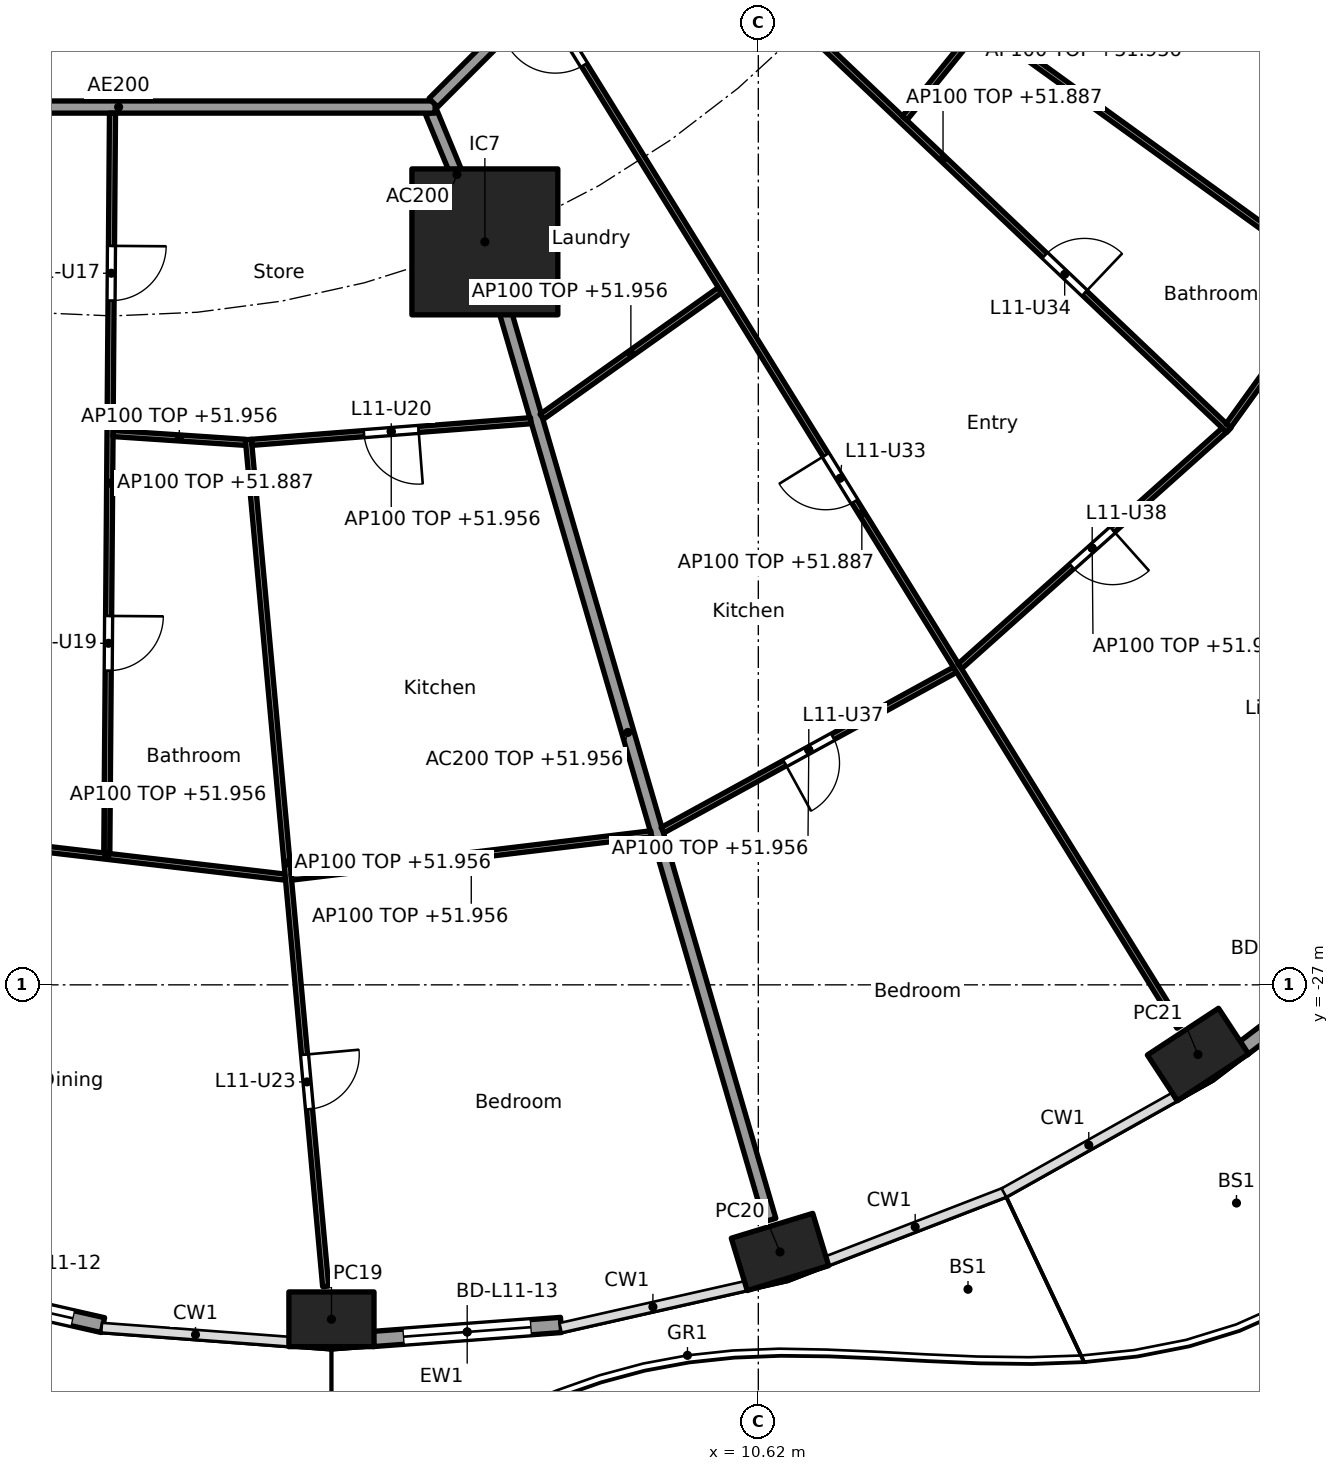
"""IFC4 building model, lengths in metres.
Left out: names, types, materials, properties, quantities, classifications, styles, units other than length and angle.
Written with IfcOpenShell. Run it as: python <this file> out.ifc"""

import sys

from ifc_helpers import new_model, si_unit, direction, frame, frame_2d, origin, origin_2d, place, context, subcontext, project, spatial, rectangle, hollow_rectangle, extrude, element, fill, save


model = new_model("IFC4")
c1 = context("Model", 3, precision=1e-05, world=origin(), true_north=direction((0.0, 1.0)))
c2 = subcontext(c1, "Body", "Model", "MODEL_VIEW")
j1 = project(units=[si_unit("LENGTHUNIT", "METRE"), si_unit("PLANEANGLEUNIT", "RADIAN")], contexts=[c1])
p1 = place(None, origin())
s1 = spatial("IfcSite", under=j1, at=p1, CompositionType="ELEMENT")
p2 = place(p1, origin())
s2 = spatial("IfcBuilding", under=s1, at=p2, CompositionType="ELEMENT")
p3 = place(p2, frame((0.0, 0.0, 49.2)))
s3 = spatial("IfcBuildingStorey", under=s2, at=p3, CompositionType="ELEMENT", Elevation=49.2)
for number, where, z_axis, x_axis in (
    (1, (3.6, -32.5, 0.0), (0.0, 0.0, 1.0), (1.0, 0.0, 0.0)),
    (2, (10.976, -31.393, 0.0), (0.0, 0.0, 1.0), (0.957, 0.292, 0.0)),
    (3, (17.85, -28.146, 0.0), (0.0, 0.0, 1.0), (0.836, 0.549, 0.0)),
):
    element("IfcColumn", number, at=place(p3, frame(where, z_axis=z_axis, x_axis=x_axis)), inside=s3, PredefinedType="COLUMN", context=c2, shape_type="SweptSolid", body=[
        extrude(hollow_rectangle(XDim=1.4, YDim=0.9, WallThickness=0.05, at=origin_2d()), origin(), (0.0, 0.0, 1.0), 3.7),
    ])
p4 = place(p3, frame((6.123, -14.782, 0.0), z_axis=(0.0, 0.0, 1.0), x_axis=(1.0, 0.0, 0.0)))
e4 = element("IfcColumn", 4, at=p4, inside=s3, PredefinedType="COLUMN", context=c2, shape_type="SweptSolid", body=[
    extrude(rectangle(XDim=2.4, YDim=2.4, at=origin_2d()), origin(), (0.0, 0.0, 1.0), 3.7),
])
p5 = place(p3, frame((-0.158, -32.596, 0.0), z_axis=(0.0, 0.0, 1.0), x_axis=(-0.975331134677, 0.220746863466, 0.0)))
e5 = element("IfcWall", 5, at=p5, inside=s3, PredefinedType="SOLIDWALL", context=c2, shape_type="SweptSolid", body=[
    extrude(rectangle(XDim=3.115, YDim=0.25, at=frame_2d((1.557, 0.0))), origin(), (0.0, 0.0, 1.0), 3.44),
])
p6 = place(p5, frame((0.507, 0.0, 0.0)))
e6 = element("IfcOpeningElement", 6, at=p6, cuts=e5, PredefinedType="OPENING", context=c2, shape_type="SweptSolid", body=[
    extrude(rectangle(XDim=2.1, YDim=2.4, at=frame_2d((1.05, 1.2))), frame((0.0, 0.135, 0.0), z_axis=(0.0, -1.0, 0.0), x_axis=(1.0, 0.0, 0.0)), (0.0, 0.0, 1.0), 0.27),
])
p7 = place(p3, frame((7.376, -32.593, 0.0), z_axis=(0.0, 0.0, 1.0), x_axis=(-0.997230834878, -0.074368420505, 0.0)))
e7 = element("IfcWall", 7, at=p7, inside=s3, PredefinedType="SOLIDWALL", context=c2, shape_type="SweptSolid", body=[
    extrude(rectangle(XDim=3.096, YDim=0.25, at=frame_2d((1.548, 0.0))), origin(), (0.0, 0.0, 1.0), 3.44),
])
p8 = place(p7, frame((0.498, 0.0, 0.0)))
e8 = element("IfcOpeningElement", 8, at=p8, cuts=e7, PredefinedType="OPENING", context=c2, shape_type="SweptSolid", body=[
    extrude(rectangle(XDim=2.1, YDim=2.4, at=frame_2d((1.05, 1.2))), frame((0.0, 0.135, 0.0), z_axis=(0.0, -1.0, 0.0), x_axis=(1.0, 0.0, 0.0)), (0.0, 0.0, 1.0), 0.27),
])
p9 = place(p3, frame((21.178, -26.081, 0.0), z_axis=(0.0, 0.0, 1.0), x_axis=(-0.796022293214, -0.605267303517, 0.0)))
e9 = element("IfcWall", 9, at=p9, inside=s3, PredefinedType="SOLIDWALL", context=c2, shape_type="SweptSolid", body=[
    extrude(rectangle(XDim=3.262, YDim=0.25, at=frame_2d((1.631, 0.0))), origin(), (0.0, 0.0, 1.0), 3.44),
])
p10 = place(p9, frame((0.581, 0.0, 0.0)))
e10 = element("IfcOpeningElement", 10, at=p10, cuts=e9, PredefinedType="OPENING", context=c2, shape_type="SweptSolid", body=[
    extrude(rectangle(XDim=2.1, YDim=2.4, at=frame_2d((1.05, 1.2))), frame((0.0, 0.135, 0.0), z_axis=(0.0, -1.0, 0.0), x_axis=(1.0, 0.0, 0.0)), (0.0, 0.0, 1.0), 0.27),
])
p11 = place(p3, frame((5.243, -12.657, 0.0), z_axis=(0.0, 0.0, 1.0), x_axis=(0.382707856524, -0.923869415315, 0.0)))
e11 = element("IfcWall", 11, at=p11, inside=s3, PredefinedType="PARTITIONING", context=c2, shape_type="SweptSolid", body=[
    extrude(rectangle(XDim=2.2, YDim=0.2, at=frame_2d((1.1, 0.0))), origin(), (0.0, 0.0, 1.0), 3.44),
])
p12 = place(p3, frame((6.137, -14.83, 0.0), z_axis=(0.0, 0.0, 1.0), x_axis=(0.27985745069, -0.960041565399, 0.0)))
e12 = element("IfcWall", 12, at=p12, inside=s3, PredefinedType="PARTITIONING", context=c2, shape_type="SweptSolid", body=[
    extrude(rectangle(XDim=16.705, YDim=0.2, at=frame_2d((8.353, 0.0))), origin(), (0.0, 0.0, 1.0), 2.756),
])
p13 = place(p3, frame((-5.104, -12.565, 0.0), z_axis=(0.0, 0.0, 1.0), x_axis=(1.0, 0.0, 0.0)))
e13 = element("IfcWall", 13, at=p13, inside=s3, PredefinedType="PARTITIONING", context=c2, shape_type="SweptSolid", body=[
    extrude(rectangle(XDim=10.409, YDim=0.2, at=frame_2d((5.205, 0.0))), origin(), (0.0, 0.0, 1.0), 3.44),
])
p14 = place(p13, frame((2.87, 0.0, 0.0)))
e14 = element("IfcOpeningElement", 14, at=p14, cuts=e13, PredefinedType="OPENING", context=c2, shape_type="SweptSolid", body=[
    extrude(rectangle(XDim=1.0, YDim=2.1, at=frame_2d((0.5, 1.05))), frame((0.0, 0.11, 0.0), z_axis=(0.0, -1.0, 0.0), x_axis=(1.0, 0.0, 0.0)), (0.0, 0.0, 1.0), 0.22),
])
p15 = place(p3, frame((5.275, -12.494, 0.0), z_axis=(0.0, 0.0, 1.0), x_axis=(0.707106781187, 0.707106781187, 0.0)))
e15 = element("IfcWall", 15, at=p15, inside=s3, PredefinedType="PARTITIONING", context=c2, shape_type="SweptSolid", body=[
    extrude(rectangle(XDim=10.409, YDim=0.2, at=frame_2d((5.205, 0.0))), origin(), (0.0, 0.0, 1.0), 3.44),
])
p16 = place(p15, frame((3.303, 0.0, 0.0)))
e16 = element("IfcOpeningElement", 16, at=p16, cuts=e15, PredefinedType="OPENING", context=c2, shape_type="SweptSolid", body=[
    extrude(rectangle(XDim=1.0, YDim=2.1, at=frame_2d((0.5, 1.05))), frame((0.0, 0.11, 0.0), z_axis=(0.0, -1.0, 0.0), x_axis=(1.0, 0.0, 0.0)), (0.0, 0.0, 1.0), 0.22),
])
p17 = place(p3, frame((-3.031, -24.543, 0.0), z_axis=(0.0, 0.0, 1.0), x_axis=(0.993255612046, -0.115945198862, 0.0)))
e17 = element("IfcWall", 17, at=p17, inside=s3, PredefinedType="PARTITIONING", context=c2, shape_type="SweptSolid", body=[
    extrude(rectangle(XDim=5.913, YDim=0.1, at=frame_2d((2.956, 0.0))), origin(), (0.0, 0.0, 1.0), 2.756),
])
p18 = place(p3, frame((-0.001, -12.665, 0.0), z_axis=(0.0, 0.0, 1.0), x_axis=(-0.007702417287, -0.999970335944, 0.0)))
e18 = element("IfcWall", 18, at=p18, inside=s3, PredefinedType="PARTITIONING", context=c2, shape_type="SweptSolid", body=[
    extrude(rectangle(XDim=12.171, YDim=0.1, at=frame_2d((6.086, 0.0))), origin(), (0.0, 0.0, 1.0), 2.687),
])
p19 = place(p18, frame((2.183, 0.0, 0.0)))
e19 = element("IfcOpeningElement", 19, at=p19, cuts=e18, PredefinedType="OPENING", context=c2, shape_type="SweptSolid", body=[
    extrude(rectangle(XDim=0.9, YDim=2.1, at=frame_2d((0.45, 1.05))), frame((0.0, 0.06, 0.0), z_axis=(0.0, -1.0, 0.0), x_axis=(1.0, 0.0, 0.0)), (0.0, 0.0, 1.0), 0.12),
])
p20 = place(p18, frame((8.269, 0.0, 0.0)))
e20 = element("IfcOpeningElement", 20, at=p20, cuts=e18, PredefinedType="OPENING", context=c2, shape_type="SweptSolid", body=[
    extrude(rectangle(XDim=0.9, YDim=2.1, at=frame_2d((0.45, 1.05))), frame((0.0, 0.06, 0.0), z_axis=(0.0, -1.0, 0.0), x_axis=(1.0, 0.0, 0.0)), (0.0, 0.0, 1.0), 0.12),
])
p21 = place(p3, frame((0.009, -17.934, 0.0), z_axis=(0.0, 0.0, 1.0), x_axis=(0.997794542617, -0.066378089183, 0.0)))
e21 = element("IfcWall", 21, at=p21, inside=s3, PredefinedType="PARTITIONING", context=c2, shape_type="SweptSolid", body=[
    extrude(rectangle(XDim=2.185, YDim=0.1, at=frame_2d((1.092, 0.0))), origin(), (0.0, 0.0, 1.0), 2.756),
])
p22 = place(p3, frame((2.234, -18.032, 0.0), z_axis=(0.0, 0.0, 1.0), x_axis=(0.090891502968, -0.995860800859, 0.0)))
e22 = element("IfcWall", 22, at=p22, inside=s3, PredefinedType="PARTITIONING", context=c2, shape_type="SweptSolid", body=[
    extrude(rectangle(XDim=13.984, YDim=0.1, at=frame_2d((6.992, 0.0))), origin(), (0.0, 0.0, 1.0), 2.756),
])
p23 = place(p22, frame((10.158, 0.0, 0.0)))
e23 = element("IfcOpeningElement", 23, at=p23, cuts=e22, PredefinedType="OPENING", context=c2, shape_type="SweptSolid", body=[
    extrude(rectangle(XDim=0.9, YDim=2.1, at=frame_2d((0.45, 1.05))), frame((0.0, 0.06, 0.0), z_axis=(0.0, -1.0, 0.0), x_axis=(1.0, 0.0, 0.0)), (0.0, 0.0, 1.0), 0.12),
])
p24 = place(p3, frame((2.288, -18.078, 0.0), z_axis=(0.0, 0.0, 1.0), x_axis=(0.99701850123, 0.077162868047, 0.0)))
e24 = element("IfcWall", 24, at=p24, inside=s3, PredefinedType="PARTITIONING", context=c2, shape_type="SweptSolid", body=[
    extrude(rectangle(XDim=4.604, YDim=0.1, at=frame_2d((2.302, 0.0))), origin(), (0.0, 0.0, 1.0), 2.756),
])
p25 = place(p24, frame((1.852, 0.0, 0.0)))
e25 = element("IfcOpeningElement", 25, at=p25, cuts=e24, PredefinedType="OPENING", context=c2, shape_type="SweptSolid", body=[
    extrude(rectangle(XDim=0.9, YDim=2.1, at=frame_2d((0.45, 1.05))), frame((0.0, 0.06, 0.0), z_axis=(0.0, -1.0, 0.0), x_axis=(1.0, 0.0, 0.0)), (0.0, 0.0, 1.0), 0.12),
])
p26 = place(p3, frame((2.941, -25.229, 0.0), z_axis=(0.0, 0.0, 1.0), x_axis=(0.992834127896, 0.119500604542, 0.0)))
e26 = element("IfcWall", 26, at=p26, inside=s3, PredefinedType="PARTITIONING", context=c2, shape_type="SweptSolid", body=[
    extrude(rectangle(XDim=5.959, YDim=0.1, at=frame_2d((2.98, 0.0))), origin(), (0.0, 0.0, 1.0), 2.756),
])
p27 = place(p3, frame((7.06, -17.657, 0.0), z_axis=(0.0, 0.0, 1.0), x_axis=(0.81492039338, 0.57957290521, 0.0)))
e27 = element("IfcWall", 27, at=p27, inside=s3, PredefinedType="PARTITIONING", context=c2, shape_type="SweptSolid", body=[
    extrude(rectangle(XDim=3.594, YDim=0.1, at=frame_2d((1.797, 0.0))), origin(), (0.0, 0.0, 1.0), 2.756),
])
p28 = place(p3, frame((9.045, -24.456, 0.0), z_axis=(0.0, 0.0, 1.0), x_axis=(0.876809987787, 0.480837025734, 0.0)))
e28 = element("IfcWall", 28, at=p28, inside=s3, PredefinedType="PARTITIONING", context=c2, shape_type="SweptSolid", body=[
    extrude(rectangle(XDim=5.486, YDim=0.1, at=frame_2d((2.743, 0.0))), origin(), (0.0, 0.0, 1.0), 2.756),
])
p29 = place(p28, frame((2.293, 0.0, 0.0)))
e29 = element("IfcOpeningElement", 29, at=p29, cuts=e28, PredefinedType="OPENING", context=c2, shape_type="SweptSolid", body=[
    extrude(rectangle(XDim=0.9, YDim=2.1, at=frame_2d((0.45, 1.05))), frame((0.0, 0.06, 0.0), z_axis=(0.0, -1.0, 0.0), x_axis=(1.0, 0.0, 0.0)), (0.0, 0.0, 1.0), 0.12),
])
p30 = place(p3, frame((7.097, -10.81, 0.0), z_axis=(0.0, 0.0, 1.0), x_axis=(0.526453266471, -0.850204068576, 0.0)))
e30 = element("IfcWall", 30, at=p30, inside=s3, PredefinedType="PARTITIONING", context=c2, shape_type="SweptSolid", body=[
    extrude(rectangle(XDim=19.85, YDim=0.1, at=frame_2d((9.925, 0.0))), origin(), (0.0, 0.0, 1.0), 2.687),
])
p31 = place(p30, frame((0.35, 0.0, 0.0)))
e31 = element("IfcOpeningElement", 31, at=p31, cuts=e30, PredefinedType="OPENING", context=c2, shape_type="SweptSolid", body=[
    extrude(rectangle(XDim=0.9, YDim=2.1, at=frame_2d((0.45, 1.05))), frame((0.0, 0.06, 0.0), z_axis=(0.0, -1.0, 0.0), x_axis=(1.0, 0.0, 0.0)), (0.0, 0.0, 1.0), 0.12),
])
p32 = place(p30, frame((8.795, 0.0, 0.0)))
e32 = element("IfcOpeningElement", 32, at=p32, cuts=e30, PredefinedType="OPENING", context=c2, shape_type="SweptSolid", body=[
    extrude(rectangle(XDim=0.9, YDim=2.1, at=frame_2d((0.45, 1.05))), frame((0.0, 0.06, 0.0), z_axis=(0.0, -1.0, 0.0), x_axis=(1.0, 0.0, 0.0)), (0.0, 0.0, 1.0), 0.12),
])
p33 = place(p3, frame((13.936, -21.761, 0.0), z_axis=(0.0, 0.0, 1.0), x_axis=(0.745806142791, 0.666163041136, 0.0)))
e33 = element("IfcWall", 33, at=p33, inside=s3, PredefinedType="PARTITIONING", context=c2, shape_type="SweptSolid", body=[
    extrude(rectangle(XDim=5.831, YDim=0.1, at=frame_2d((2.915, 0.0))), origin(), (0.0, 0.0, 1.0), 2.756),
])
p34 = place(p33, frame((2.465, 0.0, 0.0)))
e34 = element("IfcOpeningElement", 34, at=p34, cuts=e33, PredefinedType="OPENING", context=c2, shape_type="SweptSolid", body=[
    extrude(rectangle(XDim=0.9, YDim=2.1, at=frame_2d((0.45, 1.05))), frame((0.0, 0.06, 0.0), z_axis=(0.0, -1.0, 0.0), x_axis=(1.0, 0.0, 0.0)), (0.0, 0.0, 1.0), 0.12),
])
p35 = place(p3, frame((8.957, -8.953, 0.0), z_axis=(0.0, 0.0, 1.0), x_axis=(0.725250022034, -0.688485588476, 0.0)))
e35 = element("IfcWall", 35, at=p35, inside=s3, PredefinedType="PARTITIONING", context=c2, shape_type="SweptSolid", body=[
    extrude(rectangle(XDim=12.963, YDim=0.1, at=frame_2d((6.481, 0.0))), origin(), (0.0, 0.0, 1.0), 2.687),
])
p36 = place(p35, frame((2.333, 0.0, 0.0)))
e36 = element("IfcOpeningElement", 36, at=p36, cuts=e35, PredefinedType="OPENING", context=c2, shape_type="SweptSolid", body=[
    extrude(rectangle(XDim=0.9, YDim=2.1, at=frame_2d((0.45, 1.05))), frame((0.0, 0.06, 0.0), z_axis=(0.0, -1.0, 0.0), x_axis=(1.0, 0.0, 0.0)), (0.0, 0.0, 1.0), 0.12),
])
p37 = place(p35, frame((8.79, 0.0, 0.0)))
e37 = element("IfcOpeningElement", 37, at=p37, cuts=e35, PredefinedType="OPENING", context=c2, shape_type="SweptSolid", body=[
    extrude(rectangle(XDim=0.9, YDim=2.1, at=frame_2d((0.45, 1.05))), frame((0.0, 0.06, 0.0), z_axis=(0.0, -1.0, 0.0), x_axis=(1.0, 0.0, 0.0)), (0.0, 0.0, 1.0), 0.12),
])
p38 = place(p3, frame((13.026, -12.747, 0.0), z_axis=(0.0, 0.0, 1.0), x_axis=(0.630126826288, 0.776492229705, 0.0)))
e38 = element("IfcWall", 38, at=p38, inside=s3, PredefinedType="PARTITIONING", context=c2, shape_type="SweptSolid", body=[
    extrude(rectangle(XDim=4.007, YDim=0.1, at=frame_2d((2.003, 0.0))), origin(), (0.0, 0.0, 1.0), 2.756),
])
p39 = place(p3, frame((18.351, -17.803, 0.0), z_axis=(0.0, 0.0, 1.0), x_axis=(0.584563700282, 0.811347817099, 0.0)))
e39 = element("IfcWall", 39, at=p39, inside=s3, PredefinedType="PARTITIONING", context=c2, shape_type="SweptSolid", body=[
    extrude(rectangle(XDim=5.984, YDim=0.1, at=frame_2d((2.992, 0.0))), origin(), (0.0, 0.0, 1.0), 2.756),
])
p40 = place(p39, frame((4.038, 0.0, 0.0)))
e40 = element("IfcOpeningElement", 40, at=p40, cuts=e39, PredefinedType="OPENING", context=c2, shape_type="SweptSolid", body=[
    extrude(rectangle(XDim=0.9, YDim=2.1, at=frame_2d((0.45, 1.05))), frame((0.0, 0.06, 0.0), z_axis=(0.0, -1.0, 0.0), x_axis=(1.0, 0.0, 0.0)), (0.0, 0.0, 1.0), 0.12),
])
p41 = place(p3, frame((14.329, -11.221, 0.0), z_axis=(0.0, 0.0, 1.0), x_axis=(0.810671130917, -0.58550176558, 0.0)))
e41 = element("IfcWall", 41, at=p41, inside=s3, PredefinedType="PARTITIONING", context=c2, shape_type="SweptSolid", body=[
    extrude(rectangle(XDim=15.106, YDim=0.1, at=frame_2d((7.553, 0.0))), origin(), (0.0, 0.0, 1.0), 2.837),
])
p42 = place(p41, frame((10.659, 0.0, 0.0)))
e42 = element("IfcOpeningElement", 42, at=p42, cuts=e41, PredefinedType="OPENING", context=c2, shape_type="SweptSolid", body=[
    extrude(rectangle(XDim=0.9, YDim=2.1, at=frame_2d((0.45, 1.05))), frame((0.0, 0.06, 0.0), z_axis=(0.0, -1.0, 0.0), x_axis=(1.0, 0.0, 0.0)), (0.0, 0.0, 1.0), 0.12),
])
p43 = place(p3, frame((15.538, -9.574, 0.0), z_axis=(0.0, 0.0, 1.0), x_axis=(0.88517945493, -0.465249752895, 0.0)))
e43 = element("IfcWall", 43, at=p43, inside=s3, PredefinedType="PARTITIONING", context=c2, shape_type="SweptSolid", body=[
    extrude(rectangle(XDim=7.213, YDim=0.1, at=frame_2d((3.606, 0.0))), origin(), (0.0, 0.0, 1.0), 3.44),
])
p44 = place(p6, origin())
e44 = element("IfcDoor", 44, at=p44, inside=s3, OperationType="SLIDING_TO_LEFT", PredefinedType="DOOR", context=c2, shape_type="SweptSolid", body=[
    extrude(rectangle(XDim=2.1, YDim=2.4, at=frame_2d((1.05, 1.2))), frame((0.0, 0.025, 0.0), z_axis=(0.0, -1.0, 0.0), x_axis=(1.0, 0.0, 0.0)), (0.0, 0.0, 1.0), 0.05),
])
fill(e6, e44)
p45 = place(p8, origin())
e45 = element("IfcDoor", 45, at=p45, inside=s3, OperationType="SLIDING_TO_LEFT", PredefinedType="DOOR", context=c2, shape_type="SweptSolid", body=[
    extrude(rectangle(XDim=2.1, YDim=2.4, at=frame_2d((1.05, 1.2))), frame((0.0, 0.025, 0.0), z_axis=(0.0, -1.0, 0.0), x_axis=(1.0, 0.0, 0.0)), (0.0, 0.0, 1.0), 0.05),
])
fill(e8, e45)
p46 = place(p19, origin())
e46 = element("IfcDoor", 46, at=p46, inside=s3, OperationType="SINGLE_SWING_LEFT", PredefinedType="DOOR", context=c2, shape_type="SweptSolid", body=[
    extrude(rectangle(XDim=0.9, YDim=2.1, at=frame_2d((0.45, 1.05))), frame((0.0, 0.025, 0.0), z_axis=(0.0, -1.0, 0.0), x_axis=(1.0, 0.0, 0.0)), (0.0, 0.0, 1.0), 0.05),
])
fill(e19, e46)
p47 = place(p20, origin())
e47 = element("IfcDoor", 47, at=p47, inside=s3, OperationType="SINGLE_SWING_LEFT", PredefinedType="DOOR", context=c2, shape_type="SweptSolid", body=[
    extrude(rectangle(XDim=0.9, YDim=2.1, at=frame_2d((0.45, 1.05))), frame((0.0, 0.025, 0.0), z_axis=(0.0, -1.0, 0.0), x_axis=(1.0, 0.0, 0.0)), (0.0, 0.0, 1.0), 0.05),
])
fill(e20, e47)
p48 = place(p25, frame((0.9, 0.0, 0.0), x_axis=(-1.0, 0.0, 0.0)))
e48 = element("IfcDoor", 48, at=p48, inside=s3, OperationType="SINGLE_SWING_LEFT", PredefinedType="DOOR", context=c2, shape_type="SweptSolid", body=[
    extrude(rectangle(XDim=0.9, YDim=2.1, at=frame_2d((0.45, 1.05))), frame((0.0, 0.025, 0.0), z_axis=(0.0, -1.0, 0.0), x_axis=(1.0, 0.0, 0.0)), (0.0, 0.0, 1.0), 0.05),
])
fill(e25, e48)
p49 = place(p23, origin())
e49 = element("IfcDoor", 49, at=p49, inside=s3, OperationType="SINGLE_SWING_LEFT", PredefinedType="DOOR", context=c2, shape_type="SweptSolid", body=[
    extrude(rectangle(XDim=0.9, YDim=2.1, at=frame_2d((0.45, 1.05))), frame((0.0, 0.025, 0.0), z_axis=(0.0, -1.0, 0.0), x_axis=(1.0, 0.0, 0.0)), (0.0, 0.0, 1.0), 0.05),
])
fill(e23, e49)
p50 = place(p31, frame((0.9, 0.0, 0.0), x_axis=(-1.0, 0.0, 0.0)))
e50 = element("IfcDoor", 50, at=p50, inside=s3, OperationType="SINGLE_SWING_RIGHT", PredefinedType="DOOR", context=c2, shape_type="SweptSolid", body=[
    extrude(rectangle(XDim=0.9, YDim=2.1, at=frame_2d((0.45, 1.05))), frame((0.0, 0.025, 0.0), z_axis=(0.0, -1.0, 0.0), x_axis=(1.0, 0.0, 0.0)), (0.0, 0.0, 1.0), 0.05),
])
fill(e31, e50)
p51 = place(p32, frame((0.9, 0.0, 0.0), x_axis=(-1.0, 0.0, 0.0)))
e51 = element("IfcDoor", 51, at=p51, inside=s3, OperationType="SINGLE_SWING_RIGHT", PredefinedType="DOOR", context=c2, shape_type="SweptSolid", body=[
    extrude(rectangle(XDim=0.9, YDim=2.1, at=frame_2d((0.45, 1.05))), frame((0.0, 0.025, 0.0), z_axis=(0.0, -1.0, 0.0), x_axis=(1.0, 0.0, 0.0)), (0.0, 0.0, 1.0), 0.05),
])
fill(e32, e51)
p52 = place(p37, origin())
e52 = element("IfcDoor", 52, at=p52, inside=s3, OperationType="SINGLE_SWING_RIGHT", PredefinedType="DOOR", context=c2, shape_type="SweptSolid", body=[
    extrude(rectangle(XDim=0.9, YDim=2.1, at=frame_2d((0.45, 1.05))), frame((0.0, 0.025, 0.0), z_axis=(0.0, -1.0, 0.0), x_axis=(1.0, 0.0, 0.0)), (0.0, 0.0, 1.0), 0.05),
])
fill(e37, e52)
p53 = place(p29, frame((0.9, 0.0, 0.0), x_axis=(-1.0, 0.0, 0.0)))
e53 = element("IfcDoor", 53, at=p53, inside=s3, OperationType="SINGLE_SWING_RIGHT", PredefinedType="DOOR", context=c2, shape_type="SweptSolid", body=[
    extrude(rectangle(XDim=0.9, YDim=2.1, at=frame_2d((0.45, 1.05))), frame((0.0, 0.025, 0.0), z_axis=(0.0, -1.0, 0.0), x_axis=(1.0, 0.0, 0.0)), (0.0, 0.0, 1.0), 0.05),
])
fill(e29, e53)
p54 = place(p34, frame((0.9, 0.0, 0.0), x_axis=(-1.0, 0.0, 0.0)))
e54 = element("IfcDoor", 54, at=p54, inside=s3, OperationType="SINGLE_SWING_LEFT", PredefinedType="DOOR", context=c2, shape_type="SweptSolid", body=[
    extrude(rectangle(XDim=0.9, YDim=2.1, at=frame_2d((0.45, 1.05))), frame((0.0, 0.025, 0.0), z_axis=(0.0, -1.0, 0.0), x_axis=(1.0, 0.0, 0.0)), (0.0, 0.0, 1.0), 0.05),
])
fill(e34, e54)
save(model, sys.argv[1])
